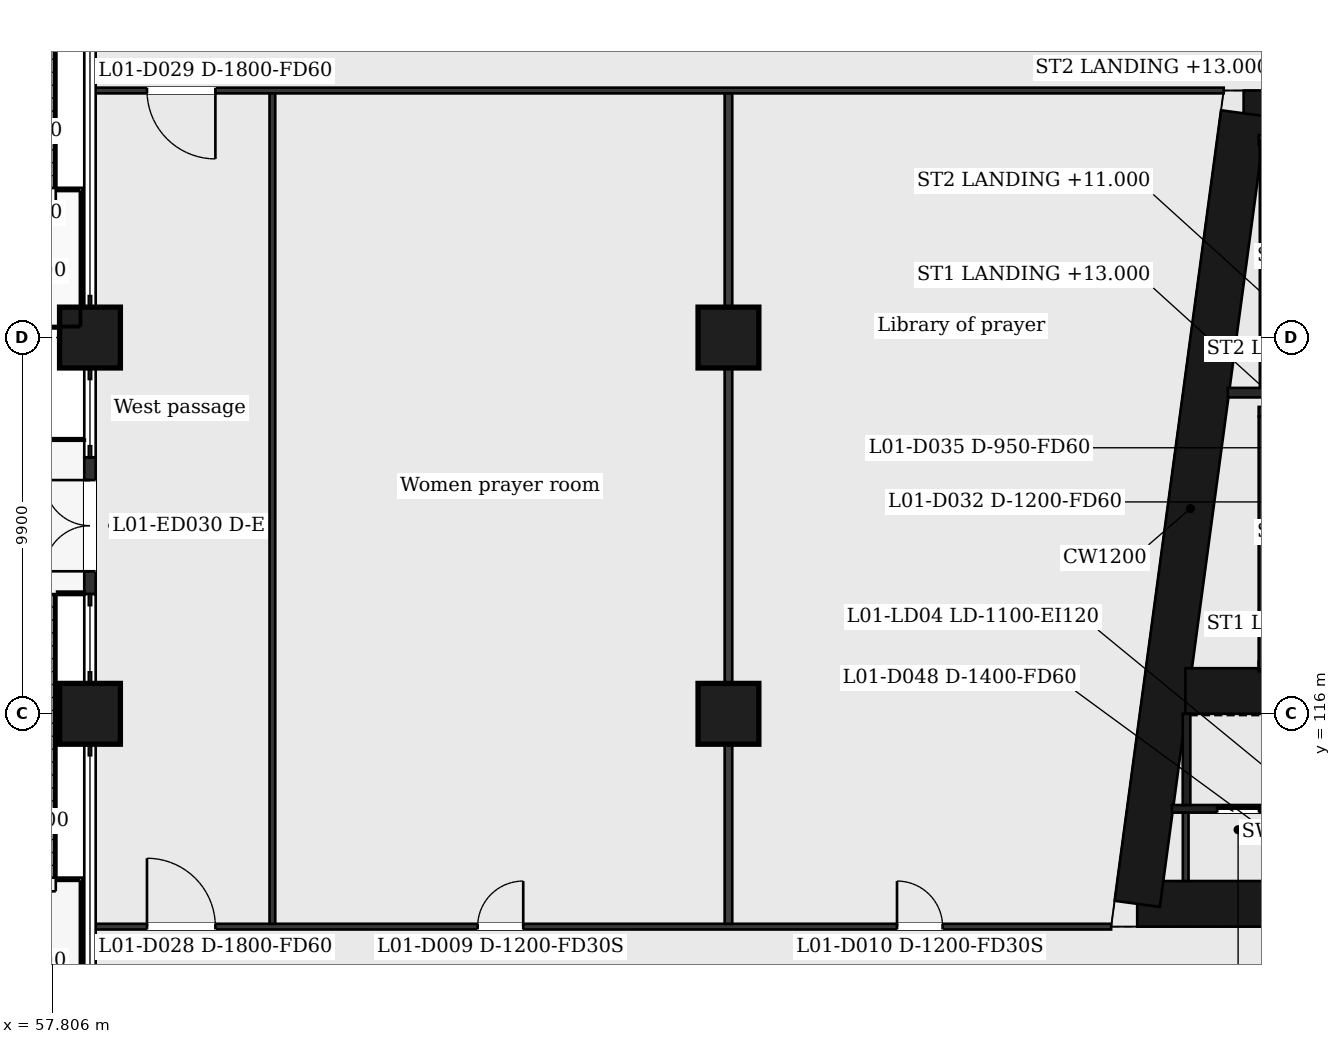
"""IFC4 building model, lengths in metres.
Left out: names, types, materials, properties, quantities, classifications, styles, units other than length and angle.
Written with IfcOpenShell. Run it as: python <this file> out.ifc"""

import sys

from ifc_helpers import new_model, si_unit, direction, frame, frame_2d, origin, origin_2d, place, context, subcontext, project, spatial, rectangle, extrude, element, fill, save


model = new_model("IFC4")
c1 = context("Model", 3, precision=1e-05, world=origin(), true_north=direction((0.0, 1.0)))
c2 = subcontext(c1, "Body", "Model", "MODEL_VIEW")
j1 = project(units=[si_unit("LENGTHUNIT", "METRE"), si_unit("PLANEANGLEUNIT", "RADIAN")], contexts=[c1])
p1 = place(None, origin())
s1 = spatial("IfcSite", under=j1, at=p1, CompositionType="ELEMENT")
p2 = place(p1, origin())
s2 = spatial("IfcBuilding", under=s1, at=p2, CompositionType="ELEMENT")
p3 = place(p2, frame((0.0, 0.0, 9.0)))
s3 = spatial("IfcBuildingStorey", under=s2, at=p3, CompositionType="ELEMENT", Elevation=9.0)
p4 = place(p3, frame((89.156, 131.8, 0.0), z_axis=(0.0, 0.0, 1.0), x_axis=(1.0, 0.0, 0.0)))
e1 = element("IfcWall", 1, at=p4, inside=s3, PredefinedType="SHEAR", context=c2, shape_type="SweptSolid", body=[
    extrude(rectangle(XDim=11.044, YDim=1.2, at=frame_2d((5.522, 0.0))), origin(), (0.0, 0.0, 1.0), 8.0),
])
p5 = place(p4, frame((6.458, 0.0, 0.0)))
e2 = element("IfcOpeningElement", 2, at=p5, cuts=e1, PredefinedType="OPENING", context=c2, shape_type="SweptSolid", body=[
    extrude(rectangle(XDim=1.2, YDim=2.1, at=frame_2d((0.6, 1.05))), frame((0.0, 0.61, 0.0), z_axis=(0.0, -1.0, 0.0), x_axis=(1.0, 0.0, 0.0)), (0.0, 0.0, 1.0), 1.22),
])
p6 = place(p3, frame((100.2, 111.0, 0.0), z_axis=(0.0, 0.0, 1.0), x_axis=(-1.0, 0.0, 0.0)))
e3 = element("IfcWall", 3, at=p6, inside=s3, PredefinedType="SHEAR", context=c2, shape_type="SweptSolid", body=[
    extrude(rectangle(XDim=13.844, YDim=1.2, at=frame_2d((6.922, 0.0))), origin(), (0.0, 0.0, 1.0), 8.0),
])
p7 = place(p6, frame((5.694, 0.0, 0.0)))
e4 = element("IfcOpeningElement", 4, at=p7, cuts=e3, PredefinedType="OPENING", context=c2, shape_type="SweptSolid", body=[
    extrude(rectangle(XDim=1.4, YDim=2.1, at=frame_2d((0.7, 1.05))), frame((0.0, 0.61, 0.0), z_axis=(0.0, -1.0, 0.0), x_axis=(1.0, 0.0, 0.0)), (0.0, 0.0, 1.0), 1.22),
])
p8 = place(p3, frame((86.355, 111.0, 0.0), z_axis=(0.0, 0.0, 1.0), x_axis=(0.133413989637, 0.99106039542, 0.0)))
e5 = element("IfcWall", 5, at=p8, inside=s3, PredefinedType="SHEAR", context=c2, shape_type="SweptSolid", body=[
    extrude(rectangle(XDim=20.988, YDim=1.2, at=frame_2d((10.494, 0.0))), origin(), (0.0, 0.0, 1.0), 8.0),
])
p9 = place(p3, frame((87.623, 116.6, 0.0), z_axis=(0.0, 0.0, 1.0), x_axis=(1.0, 0.0, 0.0)))
e6 = element("IfcWall", 6, at=p9, inside=s3, PredefinedType="SHEAR", context=c2, shape_type="SweptSolid", body=[
    extrude(rectangle(XDim=5.077, YDim=1.2, at=frame_2d((2.539, 0.0))), origin(), (0.0, 0.0, 1.0), 8.0),
])
for number, where, z_axis, x_axis in (
    (7, (58.8, 116.0, 0.0), (0.0, 0.0, 1.0), (1.0, 0.0, 0.0)),
    (8, (75.6, 116.0, 0.0), (0.0, 0.0, 1.0), (1.0, 0.0, 0.0)),
    (9, (58.8, 125.9, 0.0), (0.0, 0.0, 1.0), (1.0, 0.0, 0.0)),
    (10, (75.6, 125.9, 0.0), (0.0, 0.0, 1.0), (1.0, 0.0, 0.0)),
):
    element("IfcColumn", number, at=place(p3, frame(where, z_axis=z_axis, x_axis=x_axis)), inside=s3, PredefinedType="COLUMN", context=c2, shape_type="SweptSolid", body=[
        extrude(rectangle(XDim=1.6, YDim=1.6, at=origin_2d()), origin(), (0.0, 0.0, 1.0), 8.0),
    ])
p10 = place(p3, frame((58.8, 119.15, 0.0), z_axis=(0.0, 0.0, 1.0), x_axis=(0.0, 1.0, 0.0)))
e11 = element("IfcWall", 11, at=p10, inside=s3, PredefinedType="SOLIDWALL", context=c2, shape_type="SweptSolid", body=[
    extrude(rectangle(XDim=3.6, YDim=0.3, at=frame_2d((1.8, 0.0))), origin(), (0.0, 0.0, 1.0), 7.1),
])
p11 = place(p10, frame((0.6, 0.0, 0.0)))
e12 = element("IfcOpeningElement", 12, at=p11, cuts=e11, PredefinedType="OPENING", context=c2, shape_type="SweptSolid", body=[
    extrude(rectangle(XDim=2.4, YDim=2.4, at=frame_2d((1.2, 1.2))), frame((0.0, 0.16, 0.0), z_axis=(0.0, -1.0, 0.0), x_axis=(1.0, 0.0, 0.0)), (0.0, 0.0, 1.0), 0.32),
])
p12 = place(p3, frame((58.85, 110.4, 0.0), z_axis=(0.0, 0.0, 1.0), x_axis=(1.0, 0.0, 0.0)))
e13 = element("IfcWall", 13, at=p12, inside=s3, PredefinedType="PARTITIONING", context=c2, shape_type="SweptSolid", body=[
    extrude(rectangle(XDim=26.819, YDim=0.15, at=frame_2d((13.409, 0.0))), origin(), (0.0, 0.0, 1.0), 7.5),
])
p13 = place(p12, frame((10.15, 0.0, 0.0)))
e14 = element("IfcOpeningElement", 14, at=p13, cuts=e13, PredefinedType="OPENING", context=c2, shape_type="SweptSolid", body=[
    extrude(rectangle(XDim=1.2, YDim=2.1, at=frame_2d((0.6, 1.05))), frame((0.0, 0.085, 0.0), z_axis=(0.0, -1.0, 0.0), x_axis=(1.0, 0.0, 0.0)), (0.0, 0.0, 1.0), 0.17),
])
p14 = place(p12, frame((21.185, 0.0, 0.0)))
e15 = element("IfcOpeningElement", 15, at=p14, cuts=e13, PredefinedType="OPENING", context=c2, shape_type="SweptSolid", body=[
    extrude(rectangle(XDim=1.2, YDim=2.1, at=frame_2d((0.6, 1.05))), frame((0.0, 0.085, 0.0), z_axis=(0.0, -1.0, 0.0), x_axis=(1.0, 0.0, 0.0)), (0.0, 0.0, 1.0), 0.17),
])
p15 = place(p12, frame((1.45, 0.0, 0.0)))
e16 = element("IfcOpeningElement", 16, at=p15, cuts=e13, PredefinedType="OPENING", context=c2, shape_type="SweptSolid", body=[
    extrude(rectangle(XDim=1.8, YDim=2.1, at=frame_2d((0.9, 1.05))), frame((0.0, 0.085, 0.0), z_axis=(0.0, -1.0, 0.0), x_axis=(1.0, 0.0, 0.0)), (0.0, 0.0, 1.0), 0.17),
])
p16 = place(p3, frame((87.267, 113.5, 0.0), z_axis=(0.0, 0.0, 1.0), x_axis=(1.0, 0.0, 0.0)))
e17 = element("IfcWall", 17, at=p16, inside=s3, PredefinedType="PARTITIONING", context=c2, shape_type="SweptSolid", body=[
    extrude(rectangle(XDim=5.66, YDim=0.2, at=frame_2d((2.83, 0.0))), origin(), (0.0, 0.0, 1.0), 7.5),
])
p17 = place(p16, frame((1.193, 0.0, 0.0)))
e18 = element("IfcOpeningElement", 18, at=p17, cuts=e17, PredefinedType="OPENING", context=c2, shape_type="SweptSolid", body=[
    extrude(rectangle(XDim=1.1, YDim=2.1, at=frame_2d((0.55, 1.05))), frame((0.0, 0.11, 0.0), z_axis=(0.0, -1.0, 0.0), x_axis=(1.0, 0.0, 0.0)), (0.0, 0.0, 1.0), 0.22),
])
p18 = place(p16, frame((3.91, 0.0, 0.0)))
e19 = element("IfcOpeningElement", 19, at=p18, cuts=e17, PredefinedType="OPENING", context=c2, shape_type="SweptSolid", body=[
    extrude(rectangle(XDim=1.1, YDim=2.1, at=frame_2d((0.55, 1.05))), frame((0.0, 0.11, 0.0), z_axis=(0.0, -1.0, 0.0), x_axis=(1.0, 0.0, 0.0)), (0.0, 0.0, 1.0), 0.22),
])
for number, where, z_axis, x_axis in (
    (20, (89.552, 117.245, 0.0), (0.0, 0.0, 1.0), (1.0, 0.0, 0.0)),
    (21, (89.552, 123.95, 0.0), (0.0, 0.0, 1.0), (1.0, 0.0, 0.0)),
):
    element("IfcWall", number, at=place(p3, frame(where, z_axis=z_axis, x_axis=x_axis)), inside=s3, PredefinedType="PARTITIONING", context=c2, shape_type="SweptSolid", body=[
        extrude(rectangle(XDim=3.4, YDim=0.25, at=frame_2d((1.7, 0.0))), origin(), (0.0, 0.0, 1.0), 7.5),
    ])
p19 = place(p3, frame((88.741, 124.45, 0.0), z_axis=(0.0, 0.0, 1.0), x_axis=(1.0, 0.0, 0.0)))
e22 = element("IfcWall", 22, at=p19, inside=s3, PredefinedType="PARTITIONING", context=c2, shape_type="SweptSolid", body=[
    extrude(rectangle(XDim=4.21, YDim=0.25, at=frame_2d((2.105, 0.0))), origin(), (0.0, 0.0, 1.0), 7.5),
])
p20 = place(p3, frame((89.552, 131.101, 0.0), z_axis=(0.0, 0.0, 1.0), x_axis=(1.0, 0.0, 0.0)))
e23 = element("IfcWall", 23, at=p20, inside=s3, PredefinedType="PARTITIONING", context=c2, shape_type="SweptSolid", body=[
    extrude(rectangle(XDim=3.4, YDim=0.25, at=frame_2d((1.7, 0.0))), origin(), (0.0, 0.0, 1.0), 7.5),
])
p21 = place(p3, frame((58.85, 132.4, 0.0), z_axis=(0.0, 0.0, 1.0), x_axis=(1.0, 0.0, 0.0)))
e24 = element("IfcWall", 24, at=p21, inside=s3, PredefinedType="PARTITIONING", context=c2, shape_type="SweptSolid", body=[
    extrude(rectangle(XDim=29.781, YDim=0.15, at=frame_2d((14.891, 0.0))), origin(), (0.0, 0.0, 1.0), 7.5),
])
p22 = place(p21, frame((1.45, 0.0, 0.0)))
e25 = element("IfcOpeningElement", 25, at=p22, cuts=e24, PredefinedType="OPENING", context=c2, shape_type="SweptSolid", body=[
    extrude(rectangle(XDim=1.8, YDim=2.1, at=frame_2d((0.9, 1.05))), frame((0.0, 0.085, 0.0), z_axis=(0.0, -1.0, 0.0), x_axis=(1.0, 0.0, 0.0)), (0.0, 0.0, 1.0), 0.17),
])
p23 = place(p3, frame((63.6, 110.475, 0.0), z_axis=(0.0, 0.0, 1.0), x_axis=(0.0, 1.0, 0.0)))
e26 = element("IfcWall", 26, at=p23, inside=s3, PredefinedType="PARTITIONING", context=c2, shape_type="SweptSolid", body=[
    extrude(rectangle(XDim=21.85, YDim=0.15, at=frame_2d((10.925, 0.0))), origin(), (0.0, 0.0, 1.0), 7.5),
])
p24 = place(p3, frame((75.6, 110.475, 0.0), z_axis=(0.0, 0.0, 1.0), x_axis=(0.0, 1.0, 0.0)))
e27 = element("IfcWall", 27, at=p24, inside=s3, PredefinedType="PARTITIONING", context=c2, shape_type="SweptSolid", body=[
    extrude(rectangle(XDim=21.85, YDim=0.2, at=frame_2d((10.925, 0.0))), origin(), (0.0, 0.0, 1.0), 7.5),
])
p25 = place(p3, frame((87.653, 113.6, 0.0), z_axis=(0.0, 0.0, 1.0), x_axis=(0.0, 1.0, 0.0)))
e28 = element("IfcWall", 28, at=p25, inside=s3, PredefinedType="PARTITIONING", context=c2, shape_type="SweptSolid", body=[
    extrude(rectangle(XDim=2.4, YDim=0.2, at=frame_2d((1.2, 0.0))), origin(), (0.0, 0.0, 1.0), 7.5),
])
p26 = place(p3, frame((87.631, 111.6, 0.0), z_axis=(0.0, 0.0, 1.0), x_axis=(0.0, 1.0, 0.0)))
e29 = element("IfcWall", 29, at=p26, inside=s3, PredefinedType="PARTITIONING", context=c2, shape_type="SweptSolid", body=[
    extrude(rectangle(XDim=1.8, YDim=0.15, at=frame_2d((0.9, 0.0))), origin(), (0.0, 0.0, 1.0), 7.5),
])
p27 = place(p3, frame((89.677, 117.17, 0.0), z_axis=(0.0, 0.0, 1.0), x_axis=(0.0, 1.0, 0.0)))
e30 = element("IfcWall", 30, at=p27, inside=s3, PredefinedType="PARTITIONING", context=c2, shape_type="SweptSolid", body=[
    extrude(rectangle(XDim=6.655, YDim=0.25, at=frame_2d((3.328, 0.0))), origin(), (0.0, 0.0, 1.0), 7.5),
])
p28 = place(p3, frame((89.707, 124.575, 0.0), z_axis=(0.0, 0.0, 1.0), x_axis=(0.0, 1.0, 0.0)))
e31 = element("IfcWall", 31, at=p28, inside=s3, PredefinedType="PARTITIONING", context=c2, shape_type="SweptSolid", body=[
    extrude(rectangle(XDim=6.5, YDim=0.25, at=frame_2d((3.25, 0.0))), origin(), (0.0, 0.0, 1.0), 7.5),
])
p29 = place(p11, origin())
e32 = element("IfcDoor", 32, at=p29, inside=s3, OperationType="DOUBLE_DOOR_DOUBLE_SWING", PredefinedType="DOOR", context=c2, shape_type="SweptSolid", body=[
    extrude(rectangle(XDim=2.4, YDim=2.4, at=frame_2d((1.2, 1.2))), frame((0.0, 0.025, 0.0), z_axis=(0.0, -1.0, 0.0), x_axis=(1.0, 0.0, 0.0)), (0.0, 0.0, 1.0), 0.05),
])
fill(e12, e32)
p30 = place(p13, origin())
e33 = element("IfcDoor", 33, at=p30, inside=s3, OperationType="SINGLE_SWING_RIGHT", PredefinedType="DOOR", context=c2, shape_type="SweptSolid", body=[
    extrude(rectangle(XDim=1.2, YDim=2.1, at=frame_2d((0.6, 1.05))), frame((0.0, 0.025, 0.0), z_axis=(0.0, -1.0, 0.0), x_axis=(1.0, 0.0, 0.0)), (0.0, 0.0, 1.0), 0.05),
])
fill(e14, e33)
p31 = place(p14, origin())
e34 = element("IfcDoor", 34, at=p31, inside=s3, OperationType="SINGLE_SWING_LEFT", PredefinedType="DOOR", context=c2, shape_type="SweptSolid", body=[
    extrude(rectangle(XDim=1.2, YDim=2.1, at=frame_2d((0.6, 1.05))), frame((0.0, 0.025, 0.0), z_axis=(0.0, -1.0, 0.0), x_axis=(1.0, 0.0, 0.0)), (0.0, 0.0, 1.0), 0.05),
])
fill(e15, e34)
p32 = place(p15, origin())
e35 = element("IfcDoor", 35, at=p32, inside=s3, OperationType="SINGLE_SWING_LEFT", PredefinedType="DOOR", context=c2, shape_type="SweptSolid", body=[
    extrude(rectangle(XDim=1.8, YDim=2.1, at=frame_2d((0.9, 1.05))), frame((0.0, 0.025, 0.0), z_axis=(0.0, -1.0, 0.0), x_axis=(1.0, 0.0, 0.0)), (0.0, 0.0, 1.0), 0.05),
])
fill(e16, e35)
p33 = place(p22, origin())
e36 = element("IfcDoor", 36, at=p33, inside=s3, OperationType="SINGLE_SWING_RIGHT", PredefinedType="DOOR", context=c2, shape_type="SweptSolid", body=[
    extrude(rectangle(XDim=1.8, YDim=2.1, at=frame_2d((0.9, 1.05))), frame((0.0, 0.025, 0.0), z_axis=(0.0, -1.0, 0.0), x_axis=(1.0, 0.0, 0.0)), (0.0, 0.0, 1.0), 0.05),
])
fill(e25, e36)
p34 = place(p17, origin())
e37 = element("IfcDoor", 37, at=p34, inside=s3, OperationType="SLIDING_TO_LEFT", PredefinedType="DOOR", context=c2, shape_type="SweptSolid", body=[
    extrude(rectangle(XDim=1.1, YDim=2.1, at=frame_2d((0.55, 1.05))), frame((0.0, 0.025, 0.0), z_axis=(0.0, -1.0, 0.0), x_axis=(1.0, 0.0, 0.0)), (0.0, 0.0, 1.0), 0.05),
])
fill(e18, e37)
save(model, sys.argv[1])
